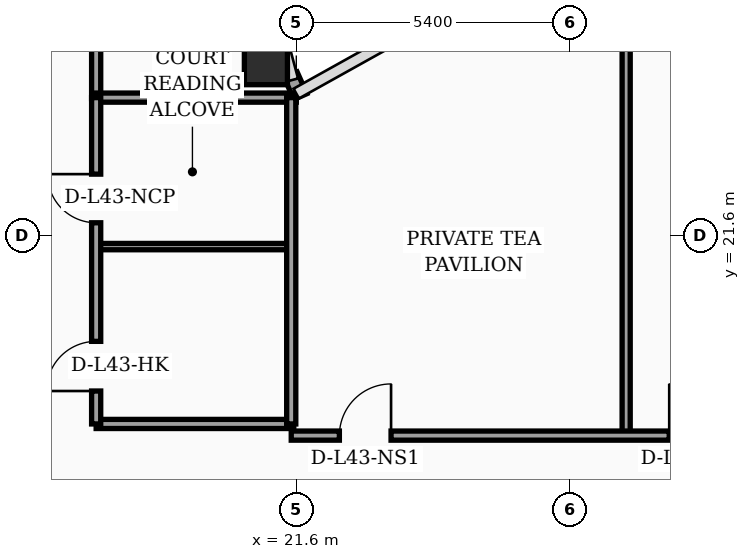
"""IFC4 building model, lengths in metres.
Left out: names, types, materials, properties, quantities, classifications, styles, units other than length and angle.
Written with IfcOpenShell. Run it as: python <this file> out.ifc"""

import sys

from ifc_helpers import new_model, si_unit, direction, frame, frame_2d, origin, origin_2d, place, context, subcontext, project, spatial, rectangle, hollow_rectangle, extrude, element, fill, save


model = new_model("IFC4")
c1 = context("Model", 3, precision=1e-05, world=origin(), true_north=direction((0.0, 1.0)))
c2 = subcontext(c1, "Body", "Model", "MODEL_VIEW")
j1 = project(units=[si_unit("LENGTHUNIT", "METRE"), si_unit("PLANEANGLEUNIT", "RADIAN")], contexts=[c1])
p1 = place(None, origin())
s1 = spatial("IfcSite", under=j1, at=p1, CompositionType="ELEMENT")
p2 = place(p1, origin())
s2 = spatial("IfcBuilding", under=s1, at=p2, CompositionType="ELEMENT")
p3 = place(p2, frame((0.0, 0.0, 175.1)))
s3 = spatial("IfcBuildingStorey", under=s2, at=p3, CompositionType="ELEMENT", Elevation=175.1)
p4 = place(p3, frame((21.0, 25.0, 0.0), z_axis=(0.0, 0.0, 1.0), x_axis=(1.0, 0.0, 0.0)))
e1 = element("IfcColumn", 1, at=p4, inside=s3, PredefinedType="COLUMN", context=c2, shape_type="SweptSolid", body=[
    extrude(hollow_rectangle(XDim=0.85, YDim=0.85, WallThickness=0.036, at=origin_2d()), origin(), (0.0, 0.0, 1.0), 3.56),
])
p5 = place(p3, frame((21.68, 24.34, 0.0), z_axis=(0.0, 0.0, 1.0), x_axis=(-0.40758134973, 0.913168901875, 0.0)))
e2 = element("IfcWall", 2, at=p5, inside=s3, PredefinedType="SOLIDWALL", context=c2, shape_type="SweptSolid", body=[
    extrude(rectangle(XDim=0.471, YDim=0.28, at=frame_2d((0.235, 0.0))), origin(), (0.0, 0.0, 1.0), 3.56),
])
p6 = place(p3, frame((17.65, 24.3, 0.0), z_axis=(0.0, 0.0, 1.0), x_axis=(0.0, 1.0, 0.0)))
e3 = element("IfcWall", 3, at=p6, inside=s3, PredefinedType="PARTITIONING", context=c2, shape_type="SweptSolid", body=[
    extrude(rectangle(XDim=17.65, YDim=0.18, at=frame_2d((8.825, 0.0))), origin(), (0.0, 0.0, 1.0), 2.94),
])
p7 = place(p3, frame((17.65, 17.88, 0.0), z_axis=(0.0, 0.0, 1.0), x_axis=(1.0, 0.0, 0.0)))
e4 = element("IfcWall", 4, at=p7, inside=s3, PredefinedType="PARTITIONING", context=c2, shape_type="SweptSolid", body=[
    extrude(rectangle(XDim=3.9, YDim=0.18, at=frame_2d((1.95, 0.0))), origin(), (0.0, 0.0, 1.0), 3.09),
])
p8 = place(p3, frame((17.65, 21.38, 0.0), z_axis=(0.0, 0.0, 1.0), x_axis=(1.0, 0.0, 0.0)))
e5 = element("IfcWall", 5, at=p8, inside=s3, PredefinedType="PARTITIONING", context=c2, shape_type="SweptSolid", body=[
    extrude(rectangle(XDim=3.9, YDim=0.125, at=frame_2d((1.95, 0.0))), origin(), (0.0, 0.0, 1.0), 3.56),
])
p9 = place(p3, frame((17.65, 24.32, 0.0), z_axis=(0.0, 0.0, 1.0), x_axis=(1.0, 0.0, 0.0)))
e6 = element("IfcWall", 6, at=p9, inside=s3, PredefinedType="PARTITIONING", context=c2, shape_type="SweptSolid", body=[
    extrude(rectangle(XDim=3.95, YDim=0.18, at=frame_2d((1.975, 0.0))), origin(), (0.0, 0.0, 1.0), 3.56),
])
p10 = place(p3, frame((21.5, 17.88, 0.0), z_axis=(0.0, 0.0, 1.0), x_axis=(0.0, 1.0, 0.0)))
e7 = element("IfcWall", 7, at=p10, inside=s3, PredefinedType="PARTITIONING", context=c2, shape_type="SweptSolid", body=[
    extrude(rectangle(XDim=6.44, YDim=0.18, at=frame_2d((3.22, 0.0))), origin(), (0.0, 0.0, 1.0), 3.09),
])
p11 = place(p3, frame((17.65, 17.88, 0.0), z_axis=(0.0, 0.0, 1.0), x_axis=(0.0, 1.0, 0.0)))
e8 = element("IfcWall", 8, at=p11, inside=s3, PredefinedType="PARTITIONING", context=c2, shape_type="SweptSolid", body=[
    extrude(rectangle(XDim=6.44, YDim=0.18, at=frame_2d((3.22, 0.0))), origin(), (0.0, 0.0, 1.0), 3.09),
])
p12 = place(p11, frame((0.65, 0.0, 0.0)))
e9 = element("IfcOpeningElement", 9, at=p12, cuts=e8, PredefinedType="OPENING", context=c2, shape_type="SweptSolid", body=[
    extrude(rectangle(XDim=0.98, YDim=2.15, at=frame_2d((0.49, 1.075))), frame((0.0, 0.1, 0.0), z_axis=(0.0, -1.0, 0.0), x_axis=(1.0, 0.0, 0.0)), (0.0, 0.0, 1.0), 0.2),
])
p13 = place(p11, frame((3.97, 0.0, 0.0)))
e10 = element("IfcOpeningElement", 10, at=p13, cuts=e8, PredefinedType="OPENING", context=c2, shape_type="SweptSolid", body=[
    extrude(rectangle(XDim=0.96, YDim=2.2, at=frame_2d((0.48, 1.1))), frame((0.0, 0.1, 0.0), z_axis=(0.0, -1.0, 0.0), x_axis=(1.0, 0.0, 0.0)), (0.0, 0.0, 1.0), 0.2),
])
p14 = place(p3, frame((28.11, 17.65, 0.0), z_axis=(0.0, 0.0, 1.0), x_axis=(0.0, 1.0, 0.0)))
e11 = element("IfcWall", 11, at=p14, inside=s3, PredefinedType="PARTITIONING", context=c2, shape_type="SweptSolid", body=[
    extrude(rectangle(XDim=10.46, YDim=0.16, at=frame_2d((5.23, 0.0))), origin(), (0.0, 0.0, 1.0), 2.94),
])
p15 = place(p3, frame((21.5, 17.65, 0.0), z_axis=(0.0, 0.0, 1.0), x_axis=(1.0, 0.0, 0.0)))
e12 = element("IfcWall", 12, at=p15, inside=s3, PredefinedType="PARTITIONING", context=c2, shape_type="SweptSolid", body=[
    extrude(rectangle(XDim=23.55, YDim=0.18, at=frame_2d((11.775, 0.0))), origin(), (0.0, 0.0, 1.0), 2.94),
])
p16 = place(p15, frame((0.95, 0.0, 0.0)))
e13 = element("IfcOpeningElement", 13, at=p16, cuts=e12, PredefinedType="OPENING", context=c2, shape_type="SweptSolid", body=[
    extrude(rectangle(XDim=1.02, YDim=2.2, at=frame_2d((0.51, 1.1))), frame((0.0, 0.1, 0.0), z_axis=(0.0, -1.0, 0.0), x_axis=(1.0, 0.0, 0.0)), (0.0, 0.0, 1.0), 0.2),
])
p17 = place(p15, frame((7.46, 0.0, 0.0)))
e14 = element("IfcOpeningElement", 14, at=p17, cuts=e12, PredefinedType="OPENING", context=c2, shape_type="SweptSolid", body=[
    extrude(rectangle(XDim=1.02, YDim=2.2, at=frame_2d((0.51, 1.1))), frame((0.0, 0.1, 0.0), z_axis=(0.0, -1.0, 0.0), x_axis=(1.0, 0.0, 0.0)), (0.0, 0.0, 1.0), 0.2),
])
p18 = place(p15, frame((12.68, 0.0, 0.0)))
e15 = element("IfcOpeningElement", 15, at=p18, cuts=e12, PredefinedType="OPENING", context=c2, shape_type="SweptSolid", body=[
    extrude(rectangle(XDim=1.02, YDim=2.2, at=frame_2d((0.51, 1.1))), frame((0.0, 0.1, 0.0), z_axis=(0.0, -1.0, 0.0), x_axis=(1.0, 0.0, 0.0)), (0.0, 0.0, 1.0), 0.2),
])
p19 = place(p15, frame((18.54, 0.0, 0.0)))
e16 = element("IfcOpeningElement", 16, at=p19, cuts=e12, PredefinedType="OPENING", context=c2, shape_type="SweptSolid", body=[
    extrude(rectangle(XDim=1.02, YDim=2.2, at=frame_2d((0.51, 1.1))), frame((0.0, 0.1, 0.0), z_axis=(0.0, -1.0, 0.0), x_axis=(1.0, 0.0, 0.0)), (0.0, 0.0, 1.0), 0.2),
])
p20 = place(p12, origin())
e17 = element("IfcDoor", 17, at=p20, inside=s3, OperationType="SINGLE_SWING_LEFT", PredefinedType="DOOR", context=c2, shape_type="SweptSolid", body=[
    extrude(rectangle(XDim=0.98, YDim=2.15, at=frame_2d((0.49, 1.075))), frame((0.0, 0.025, 0.0), z_axis=(0.0, -1.0, 0.0), x_axis=(1.0, 0.0, 0.0)), (0.0, 0.0, 1.0), 0.05),
])
fill(e9, e17)
p21 = place(p13, origin())
e18 = element("IfcDoor", 18, at=p21, inside=s3, OperationType="SINGLE_SWING_RIGHT", PredefinedType="DOOR", context=c2, shape_type="SweptSolid", body=[
    extrude(rectangle(XDim=0.96, YDim=2.2, at=frame_2d((0.48, 1.1))), frame((0.0, 0.025, 0.0), z_axis=(0.0, -1.0, 0.0), x_axis=(1.0, 0.0, 0.0)), (0.0, 0.0, 1.0), 0.05),
])
fill(e10, e18)
p22 = place(p16, origin())
e19 = element("IfcDoor", 19, at=p22, inside=s3, OperationType="SINGLE_SWING_RIGHT", PredefinedType="DOOR", context=c2, shape_type="SweptSolid", body=[
    extrude(rectangle(XDim=1.02, YDim=2.2, at=frame_2d((0.51, 1.1))), frame((0.0, 0.025, 0.0), z_axis=(0.0, -1.0, 0.0), x_axis=(1.0, 0.0, 0.0)), (0.0, 0.0, 1.0), 0.05),
])
fill(e13, e19)
p23 = place(p17, origin())
e20 = element("IfcDoor", 20, at=p23, inside=s3, OperationType="SINGLE_SWING_LEFT", PredefinedType="DOOR", context=c2, shape_type="SweptSolid", body=[
    extrude(rectangle(XDim=1.02, YDim=2.2, at=frame_2d((0.51, 1.1))), frame((0.0, 0.025, 0.0), z_axis=(0.0, -1.0, 0.0), x_axis=(1.0, 0.0, 0.0)), (0.0, 0.0, 1.0), 0.05),
])
fill(e14, e20)
save(model, sys.argv[1])
